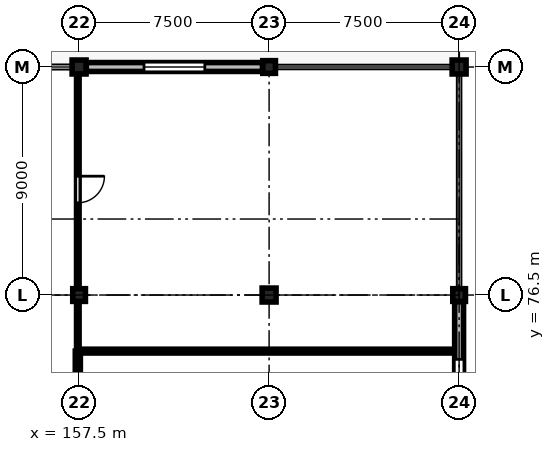
"""IFC4 building model, lengths in metres.
Left out: names, types, materials, properties, quantities, classifications, styles, units other than length and angle.
Written with IfcOpenShell. Run it as: python <this file> out.ifc"""

import sys

from ifc_helpers import new_model, si_unit, direction, frame, frame_2d, origin, origin_2d, place, context, subcontext, project, spatial, rectangle, extrude, element, fill, save


model = new_model("IFC4")
c1 = context("Model", 3, precision=1e-05, world=origin(), true_north=direction((0.0, 1.0)))
c2 = subcontext(c1, "Body", "Model", "MODEL_VIEW")
j1 = project(units=[si_unit("LENGTHUNIT", "METRE"), si_unit("PLANEANGLEUNIT", "RADIAN")], contexts=[c1])
p1 = place(None, origin())
s1 = spatial("IfcSite", under=j1, at=p1, CompositionType="ELEMENT")
p2 = place(p1, origin())
s2 = spatial("IfcBuilding", under=s1, at=p2, CompositionType="ELEMENT")
p3 = place(p2, frame((0.0, 0.0, 4.8)))
s3 = spatial("IfcBuildingStorey", under=s2, at=p3, CompositionType="ELEMENT", Elevation=4.8)
p4 = place(p3, frame((157.5, 76.5, 0.0), z_axis=(0.0, 0.0, 1.0), x_axis=(1.0, 0.0, 0.0)))
e1 = element("IfcColumn", 1, at=p4, inside=s3, PredefinedType="COLUMN", context=c2, shape_type="SweptSolid", body=[
    extrude(rectangle(XDim=0.5, YDim=0.5, at=origin_2d()), origin(), (0.0, 0.0, 1.0), 4.5),
])
for number, where, z_axis, x_axis in (
    (2, (157.5, 85.5, 0.0), (0.0, 0.0, 1.0), (1.0, 0.0, 0.0)),
    (3, (165.0, 76.5, 0.0), (0.0, 0.0, 1.0), (1.0, 0.0, 0.0)),
):
    element("IfcColumn", number, at=place(p3, frame(where, z_axis=z_axis, x_axis=x_axis)), inside=s3, PredefinedType="COLUMN", context=c2, shape_type="SweptSolid", body=[
        extrude(rectangle(XDim=0.55, YDim=0.55, at=origin_2d()), origin(), (0.0, 0.0, 1.0), 4.5),
    ])
for number, where, z_axis, x_axis in (
    (4, (165.0, 85.5, 0.0), (0.0, 0.0, 1.0), (1.0, 0.0, 0.0)),
    (5, (172.5, 76.5, 0.0), (0.0, 0.0, 1.0), (1.0, 0.0, 0.0)),
):
    element("IfcColumn", number, at=place(p3, frame(where, z_axis=z_axis, x_axis=x_axis)), inside=s3, PredefinedType="COLUMN", context=c2, shape_type="SweptSolid", body=[
        extrude(rectangle(XDim=0.5, YDim=0.5, at=origin_2d()), origin(), (0.0, 0.0, 1.0), 4.5),
    ])
p5 = place(p3, frame((172.5, 85.5, 0.0), z_axis=(0.0, 0.0, 1.0), x_axis=(1.0, 0.0, 0.0)))
e6 = element("IfcColumn", 6, at=p5, inside=s3, PredefinedType="COLUMN", context=c2, shape_type="SweptSolid", body=[
    extrude(rectangle(XDim=0.55, YDim=0.55, at=origin_2d()), origin(), (0.0, 0.0, 1.0), 4.5),
])
p6 = place(p3, frame((157.785, 85.5, 0.0), z_axis=(0.0, 0.0, 1.0), x_axis=(1.0, 0.0, 0.0)))
e7 = element("IfcWall", 7, at=p6, inside=s3, PredefinedType="STANDARD", context=c2, shape_type="SweptSolid", body=[
    extrude(rectangle(XDim=6.955, YDim=0.35, at=frame_2d((3.478, 0.0))), origin(), (0.0, 0.0, 1.0), 3.63),
])
p7 = place(p6, frame((2.278, 0.0, 0.9)))
e8 = element("IfcOpeningElement", 8, at=p7, cuts=e7, PredefinedType="OPENING", context=c2, shape_type="SweptSolid", body=[
    extrude(rectangle(XDim=2.4, YDim=2.45, at=frame_2d((1.2, 1.225))), frame((0.0, 0.185, 0.0), z_axis=(0.0, -1.0, 0.0), x_axis=(1.0, 0.0, 0.0)), (0.0, 0.0, 1.0), 0.37),
])
p8 = place(p3, frame((172.5, 76.24, 0.0), z_axis=(0.0, 0.0, 1.0), x_axis=(0.0, -1.0, 0.0)))
e9 = element("IfcWall", 9, at=p8, inside=s3, PredefinedType="STANDARD", context=c2, shape_type="SweptSolid", body=[
    extrude(rectangle(XDim=6.955, YDim=0.35, at=frame_2d((3.478, 0.0))), origin(), (0.0, 0.0, 1.0), 3.63),
])
p9 = place(p8, frame((2.278, 0.0, 0.9)))
e10 = element("IfcOpeningElement", 10, at=p9, cuts=e9, PredefinedType="OPENING", context=c2, shape_type="SweptSolid", body=[
    extrude(rectangle(XDim=2.4, YDim=2.45, at=frame_2d((1.2, 1.225))), frame((0.0, 0.185, 0.0), z_axis=(0.0, -1.0, 0.0), x_axis=(1.0, 0.0, 0.0)), (0.0, 0.0, 1.0), 0.37),
])
p10 = place(p3, frame((157.45, 74.287, 0.0), z_axis=(0.0, 0.0, 1.0), x_axis=(0.0, -1.0, 0.0)))
e11 = element("IfcWall", 11, at=p10, inside=s3, PredefinedType="STANDARD", context=c2, shape_type="SweptSolid", body=[
    extrude(rectangle(XDim=10.623, YDim=0.2, at=frame_2d((5.312, 0.0))), origin(), (0.0, 0.0, 1.0), 3.565),
])
p11 = place(p10, frame((8.416, 0.0, 0.0)))
e12 = element("IfcOpeningElement", 12, at=p11, cuts=e11, PredefinedType="OPENING", context=c2, shape_type="SweptSolid", body=[
    extrude(rectangle(XDim=1.05, YDim=2.2, at=frame_2d((0.525, 1.1))), frame((0.0, 0.11, 0.0), z_axis=(0.0, -1.0, 0.0), x_axis=(1.0, 0.0, 0.0)), (0.0, 0.0, 1.0), 0.22),
])
p12 = place(p3, frame((157.45, 85.07, 0.0), z_axis=(0.0, 0.0, 1.0), x_axis=(0.0, -1.0, 0.0)))
e13 = element("IfcWall", 13, at=p12, inside=s3, PredefinedType="PARTITIONING", context=c2, shape_type="SweptSolid", body=[
    extrude(rectangle(XDim=10.623, YDim=0.1, at=frame_2d((5.312, 0.0))), origin(), (0.0, 0.0, 1.0), 3.465),
])
p13 = place(p12, frame((3.879, 0.0, 0.0)))
e14 = element("IfcOpeningElement", 14, at=p13, cuts=e13, PredefinedType="OPENING", context=c2, shape_type="SweptSolid", body=[
    extrude(rectangle(XDim=1.05, YDim=2.2, at=frame_2d((0.525, 1.1))), frame((0.0, 0.06, 0.0), z_axis=(0.0, -1.0, 0.0), x_axis=(1.0, 0.0, 0.0)), (0.0, 0.0, 1.0), 0.12),
])
p14 = place(p3, frame((157.45, 74.287, 0.0), z_axis=(0.0, 0.0, 1.0), x_axis=(1.0, 0.0, 0.0)))
e15 = element("IfcWall", 15, at=p14, inside=s3, PredefinedType="PARTITIONING", context=c2, shape_type="SweptSolid", body=[
    extrude(rectangle(XDim=14.7, YDim=0.15, at=frame_2d((7.35, 0.0))), origin(), (0.0, 0.0, 1.0), 4.165),
])
p15 = place(p7, origin())
e16 = element("IfcWindow", 16, at=p15, inside=s3, PartitioningType="SINGLE_PANEL", PredefinedType="WINDOW", context=c2, shape_type="SweptSolid", body=[
    extrude(rectangle(XDim=2.4, YDim=2.45, at=frame_2d((1.2, 1.225))), frame((0.0, 0.03, 0.0), z_axis=(0.0, -1.0, 0.0), x_axis=(1.0, 0.0, 0.0)), (0.0, 0.0, 1.0), 0.06),
])
fill(e8, e16)
p16 = place(p9, origin())
e17 = element("IfcWindow", 17, at=p16, inside=s3, PartitioningType="SINGLE_PANEL", PredefinedType="WINDOW", context=c2, shape_type="SweptSolid", body=[
    extrude(rectangle(XDim=2.4, YDim=2.45, at=frame_2d((1.2, 1.225))), frame((0.0, 0.03, 0.0), z_axis=(0.0, -1.0, 0.0), x_axis=(1.0, 0.0, 0.0)), (0.0, 0.0, 1.0), 0.06),
])
fill(e10, e17)
p17 = place(p13, origin())
e18 = element("IfcDoor", 18, at=p17, inside=s3, OperationType="SINGLE_SWING_LEFT", PredefinedType="DOOR", context=c2, shape_type="SweptSolid", body=[
    extrude(rectangle(XDim=1.05, YDim=2.2, at=frame_2d((0.525, 1.1))), frame((0.0, 0.025, 0.0), z_axis=(0.0, -1.0, 0.0), x_axis=(1.0, 0.0, 0.0)), (0.0, 0.0, 1.0), 0.05),
])
fill(e14, e18)
save(model, sys.argv[1])
